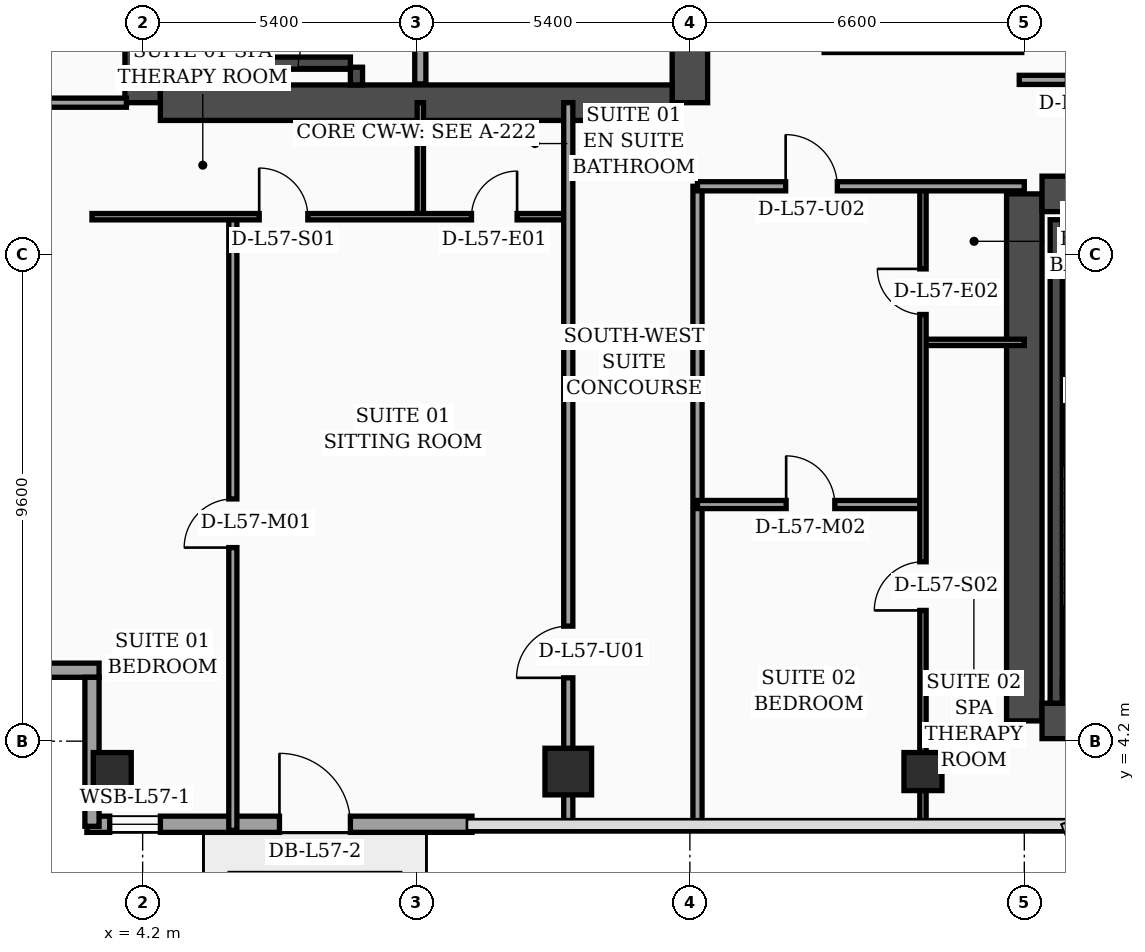
"""IFC4 building model, lengths in metres.
Left out: names, types, materials, properties, quantities, classifications, styles, units other than length and angle.
Written with IfcOpenShell. Run it as: python <this file> out.ifc"""

import sys

from ifc_helpers import new_model, si_unit, direction, frame, frame_2d, origin, origin_2d, place, context, subcontext, project, spatial, rectangle, hollow_rectangle, extrude, element, fill, save


model = new_model("IFC4")
c1 = context("Model", 3, precision=1e-05, world=origin(), true_north=direction((0.0, 1.0)))
c2 = subcontext(c1, "Body", "Model", "MODEL_VIEW")
j1 = project(units=[si_unit("LENGTHUNIT", "METRE"), si_unit("PLANEANGLEUNIT", "RADIAN")], contexts=[c1])
p1 = place(None, origin())
s1 = spatial("IfcSite", under=j1, at=p1, CompositionType="ELEMENT")
p2 = place(p1, origin())
s2 = spatial("IfcBuilding", under=s1, at=p2, CompositionType="ELEMENT")
p3 = place(p2, frame((0.0, 0.0, 230.7)))
s3 = spatial("IfcBuildingStorey", under=s2, at=p3, CompositionType="ELEMENT", Elevation=230.7)
p4 = place(p3, frame((4.2, 16.8, 0.0), z_axis=(0.0, 0.0, 1.0), x_axis=(0.0, 1.0, 0.0)))
e1 = element("IfcWall", 1, at=p4, inside=s3, PredefinedType="SHEAR", context=c2, shape_type="SweptSolid", body=[
    extrude(rectangle(XDim=21.6, YDim=0.7, at=frame_2d((10.8, 0.0))), origin(), (0.0, 0.0, 1.0), 3.52),
])
p5 = place(p3, frame((15.0, 16.8, 0.0), z_axis=(0.0, 0.0, 1.0), x_axis=(0.0, 1.0, 0.0)))
e2 = element("IfcWall", 2, at=p5, inside=s3, PredefinedType="SHEAR", context=c2, shape_type="SweptSolid", body=[
    extrude(rectangle(XDim=21.6, YDim=0.7, at=frame_2d((10.8, 0.0))), origin(), (0.0, 0.0, 1.0), 3.52),
])
p6 = place(p5, frame((8.65, 0.0, 0.0)))
e3 = element("IfcOpeningElement", 3, at=p6, cuts=e2, PredefinedType="OPENING", context=c2, shape_type="SweptSolid", body=[
    extrude(rectangle(XDim=1.1, YDim=2.2, at=frame_2d((0.55, 1.1))), frame((0.0, 0.36, 0.0), z_axis=(0.0, -1.0, 0.0), x_axis=(1.0, 0.0, 0.0)), (0.0, 0.0, 1.0), 0.72),
])
p7 = place(p5, frame((10.85, 0.0, 0.0)))
e4 = element("IfcOpeningElement", 4, at=p7, cuts=e2, PredefinedType="OPENING", context=c2, shape_type="SweptSolid", body=[
    extrude(rectangle(XDim=1.1, YDim=2.2, at=frame_2d((0.55, 1.1))), frame((0.0, 0.36, 0.0), z_axis=(0.0, -1.0, 0.0), x_axis=(1.0, 0.0, 0.0)), (0.0, 0.0, 1.0), 0.72),
])
p8 = place(p5, frame((13.5, 0.0, 0.0)))
e5 = element("IfcOpeningElement", 5, at=p8, cuts=e2, PredefinedType="OPENING", context=c2, shape_type="SweptSolid", body=[
    extrude(rectangle(XDim=1.1, YDim=2.2, at=frame_2d((0.55, 1.1))), frame((0.0, 0.36, 0.0), z_axis=(0.0, -1.0, 0.0), x_axis=(1.0, 0.0, 0.0)), (0.0, 0.0, 1.0), 0.72),
])
p9 = place(p5, frame((16.15, 0.0, 0.0)))
e6 = element("IfcOpeningElement", 6, at=p9, cuts=e2, PredefinedType="OPENING", context=c2, shape_type="SweptSolid", body=[
    extrude(rectangle(XDim=1.1, YDim=2.2, at=frame_2d((0.55, 1.1))), frame((0.0, 0.36, 0.0), z_axis=(0.0, -1.0, 0.0), x_axis=(1.0, 0.0, 0.0)), (0.0, 0.0, 1.0), 0.72),
])
p10 = place(p3, frame((4.55, 16.8, 0.0), z_axis=(0.0, 0.0, 1.0), x_axis=(1.0, 0.0, 0.0)))
e7 = element("IfcWall", 7, at=p10, inside=s3, PredefinedType="SHEAR", context=c2, shape_type="SweptSolid", body=[
    extrude(rectangle(XDim=10.1, YDim=0.7, at=frame_2d((5.05, 0.0))), origin(), (0.0, 0.0, 1.0), 3.52),
])
p11 = place(p3, frame((21.6, 4.6, 0.0), z_axis=(0.0, 0.0, 1.0), x_axis=(0.0, 1.0, 0.0)))
e8 = element("IfcWall", 8, at=p11, inside=s3, PredefinedType="SHEAR", context=c2, shape_type="SweptSolid", body=[
    extrude(rectangle(XDim=10.4, YDim=0.7, at=frame_2d((5.2, 0.0))), origin(), (0.0, 0.0, 1.0), 3.52),
])
p12 = place(p3, frame((21.95, 15.0, 0.0), z_axis=(0.0, 0.0, 1.0), x_axis=(1.0, 0.0, 0.0)))
e9 = element("IfcWall", 9, at=p12, inside=s3, PredefinedType="SHEAR", context=c2, shape_type="SweptSolid", body=[
    extrude(rectangle(XDim=10.1, YDim=0.7, at=frame_2d((5.05, 0.0))), origin(), (0.0, 0.0, 1.0), 3.52),
])
p13 = place(p12, frame((4.95, 0.0, 0.0)))
e10 = element("IfcOpeningElement", 10, at=p13, cuts=e9, PredefinedType="OPENING", context=c2, shape_type="SweptSolid", body=[
    extrude(rectangle(XDim=1.1, YDim=2.2, at=frame_2d((0.55, 1.1))), frame((0.0, 0.36, 0.0), z_axis=(0.0, -1.0, 0.0), x_axis=(1.0, 0.0, 0.0)), (0.0, 0.0, 1.0), 0.72),
])
p14 = place(p3, frame((21.95, 4.6, 0.0), z_axis=(0.0, 0.0, 1.0), x_axis=(1.0, 0.0, 0.0)))
e11 = element("IfcWall", 11, at=p14, inside=s3, PredefinedType="SHEAR", context=c2, shape_type="SweptSolid", body=[
    extrude(rectangle(XDim=10.1, YDim=0.7, at=frame_2d((5.05, 0.0))), origin(), (0.0, 0.0, 1.0), 3.52),
])
p15 = place(p3, frame((5.08, 17.15, 0.0), z_axis=(0.0, 0.0, 1.0), x_axis=(0.0, 1.0, 0.0)))
e12 = element("IfcWall", 12, at=p15, inside=s3, PredefinedType="SOLIDWALL", context=c2, shape_type="SweptSolid", body=[
    extrude(rectangle(XDim=9.64, YDim=0.24, at=frame_2d((4.82, 0.0))), origin(), (0.0, 0.0, 1.0), 3.52),
])
p16 = place(p3, frame((8.42, 17.15, 0.0), z_axis=(0.0, 0.0, 1.0), x_axis=(0.0, 1.0, 0.0)))
e13 = element("IfcWall", 13, at=p16, inside=s3, PredefinedType="SOLIDWALL", context=c2, shape_type="SweptSolid", body=[
    extrude(rectangle(XDim=9.64, YDim=0.24, at=frame_2d((4.82, 0.0))), origin(), (0.0, 0.0, 1.0), 3.52),
])
p17 = place(p16, frame((0.35, 0.0, 0.0)))
e14 = element("IfcOpeningElement", 14, at=p17, cuts=e13, PredefinedType="OPENING", context=c2, shape_type="SweptSolid", body=[
    extrude(rectangle(XDim=1.15, YDim=2.2, at=frame_2d((0.575, 1.1))), frame((0.0, 0.13, 0.0), z_axis=(0.0, -1.0, 0.0), x_axis=(1.0, 0.0, 0.0)), (0.0, 0.0, 1.0), 0.26),
])
p18 = place(p3, frame((5.2, 17.58, 0.0), z_axis=(0.0, 0.0, 1.0), x_axis=(1.0, 0.0, 0.0)))
e15 = element("IfcWall", 15, at=p18, inside=s3, PredefinedType="SOLIDWALL", context=c2, shape_type="SweptSolid", body=[
    extrude(rectangle(XDim=3.1, YDim=0.24, at=frame_2d((1.55, 0.0))), origin(), (0.0, 0.0, 1.0), 3.52),
])
p19 = place(p3, frame((22.23, 4.95, 0.0), z_axis=(0.0, 0.0, 1.0), x_axis=(0.0, 1.0, 0.0)))
e16 = element("IfcWall", 16, at=p19, inside=s3, PredefinedType="SOLIDWALL", context=c2, shape_type="SweptSolid", body=[
    extrude(rectangle(XDim=9.54, YDim=0.24, at=frame_2d((4.77, 0.0))), origin(), (0.0, 0.0, 1.0), 3.52),
])
for number, where, z_axis, x_axis in (
    (17, (22.35, 5.28, 0.0), (0.0, 0.0, 1.0), (1.0, 0.0, 0.0)),
    (18, (22.35, 14.37, 0.0), (0.0, 0.0, 1.0), (1.0, 0.0, 0.0)),
):
    element("IfcWall", number, at=place(p3, frame(where, z_axis=z_axis, x_axis=x_axis)), inside=s3, PredefinedType="SOLIDWALL", context=c2, shape_type="SweptSolid", body=[
        extrude(rectangle(XDim=3.1, YDim=0.24, at=frame_2d((1.55, 0.0))), origin(), (0.0, 0.0, 1.0), 3.52),
    ])
p20 = place(p3, frame((3.6, 3.6, 0.0), z_axis=(0.0, 0.0, 1.0), x_axis=(1.0, 0.0, 0.0)))
e19 = element("IfcColumn", 19, at=p20, inside=s3, PredefinedType="COLUMN", context=c2, shape_type="SweptSolid", body=[
    extrude(hollow_rectangle(XDim=0.75, YDim=0.75, WallThickness=0.032, at=origin_2d()), origin(), (0.0, 0.0, 1.0), 3.52),
])
p21 = place(p3, frame((12.6, 3.6, 0.0), z_axis=(0.0, 0.0, 1.0), x_axis=(1.0, 0.0, 0.0)))
e20 = element("IfcColumn", 20, at=p21, inside=s3, PredefinedType="COLUMN", context=c2, shape_type="SweptSolid", body=[
    extrude(rectangle(XDim=0.92, YDim=0.92, at=origin_2d()), origin(), (0.0, 0.0, 1.0), 3.52),
])
p22 = place(p3, frame((19.6, 3.6, 0.0), z_axis=(0.0, 0.0, 1.0), x_axis=(1.0, 0.0, 0.0)))
e21 = element("IfcColumn", 21, at=p22, inside=s3, PredefinedType="COLUMN", context=c2, shape_type="SweptSolid", body=[
    extrude(hollow_rectangle(XDim=0.75, YDim=0.75, WallThickness=0.032, at=origin_2d()), origin(), (0.0, 0.0, 1.0), 3.52),
])
p23 = place(p3, frame((3.1, 2.56, 0.0), z_axis=(0.0, 0.0, 1.0), x_axis=(1.0, 0.0, 0.0)))
e22 = element("IfcWall", 22, at=p23, inside=s3, PredefinedType="SOLIDWALL", context=c2, shape_type="SweptSolid", body=[
    extrude(rectangle(XDim=7.6, YDim=0.32, at=frame_2d((3.8, 0.0))), origin(), (0.0, 0.0, 1.0), 3.52),
])
p24 = place(p23, frame((0.45, 0.0, 0.75)))
e23 = element("IfcOpeningElement", 23, at=p24, cuts=e22, PredefinedType="OPENING", context=c2, shape_type="SweptSolid", body=[
    extrude(rectangle(XDim=1.0, YDim=1.6, at=frame_2d((0.5, 0.8))), frame((0.0, 0.17, 0.0), z_axis=(0.0, -1.0, 0.0), x_axis=(1.0, 0.0, 0.0)), (0.0, 0.0, 1.0), 0.34),
])
p25 = place(p23, frame((3.8, 0.0, 0.0)))
e24 = element("IfcOpeningElement", 24, at=p25, cuts=e22, PredefinedType="OPENING", context=c2, shape_type="SweptSolid", body=[
    extrude(rectangle(XDim=1.4, YDim=2.25, at=frame_2d((0.7, 1.125))), frame((0.0, 0.17, 0.0), z_axis=(0.0, -1.0, 0.0), x_axis=(1.0, 0.0, 0.0)), (0.0, 0.0, 1.0), 0.34),
])
p26 = place(p3, frame((0.12, 5.6, 0.0), z_axis=(0.0, 0.0, 1.0), x_axis=(1.0, 0.0, 0.0)))
e25 = element("IfcWall", 25, at=p26, inside=s3, PredefinedType="SOLIDWALL", context=c2, shape_type="SweptSolid", body=[
    extrude(rectangle(XDim=3.22, YDim=0.28, at=frame_2d((1.61, 0.0))), origin(), (0.0, 0.0, 1.0), 2.92),
])
p27 = place(p3, frame((3.2, 5.46, 0.0), z_axis=(0.0, 0.0, 1.0), x_axis=(0.0, -1.0, 0.0)))
e26 = element("IfcWall", 26, at=p27, inside=s3, PredefinedType="SOLIDWALL", context=c2, shape_type="SweptSolid", body=[
    extrude(rectangle(XDim=2.94, YDim=0.28, at=frame_2d((1.47, 0.0))), origin(), (0.0, 0.0, 1.0), 2.92),
])
p28 = place(p3, frame((9.68, 17.17, 0.0), z_axis=(0.0, 0.0, 1.0), x_axis=(0.0, 1.0, 0.0)))
e27 = element("IfcWall", 27, at=p28, inside=s3, PredefinedType="SOLIDWALL", context=c2, shape_type="SweptSolid", body=[
    extrude(rectangle(XDim=7.83, YDim=0.22, at=frame_2d((3.915, 0.0))), origin(), (0.0, 0.0, 1.0), 3.52),
])
p29 = place(p3, frame((0.08, 16.8, 0.0), z_axis=(0.0, 0.0, 1.0), x_axis=(1.0, 0.0, 0.0)))
e28 = element("IfcWall", 28, at=p29, inside=s3, PredefinedType="PARTITIONING", context=c2, shape_type="SweptSolid", body=[
    extrude(rectangle(XDim=3.8, YDim=0.18, at=frame_2d((1.9, 0.0))), origin(), (0.0, 0.0, 1.0), 2.92),
])
p30 = place(p3, frame((9.68, 14.55, 0.0), z_axis=(0.0, 0.0, 1.0), x_axis=(0.0, 1.0, 0.0)))
e29 = element("IfcWall", 29, at=p30, inside=s3, PredefinedType="PARTITIONING", context=c2, shape_type="SweptSolid", body=[
    extrude(rectangle(XDim=2.25, YDim=0.125, at=frame_2d((1.125, 0.0))), origin(), (0.0, 0.0, 1.0), 3.52),
])
p31 = place(p3, frame((5.98, 2.44, 0.0), z_axis=(0.0, 0.0, 1.0), x_axis=(0.0, 1.0, 0.0)))
e30 = element("IfcWall", 30, at=p31, inside=s3, PredefinedType="PARTITIONING", context=c2, shape_type="SweptSolid", body=[
    extrude(rectangle(XDim=12.11, YDim=0.16, at=frame_2d((6.055, 0.0))), origin(), (0.0, 0.0, 1.0), 3.07),
])
p32 = place(p31, frame((5.58, 0.0, 0.0)))
e31 = element("IfcOpeningElement", 31, at=p32, cuts=e30, PredefinedType="OPENING", context=c2, shape_type="SweptSolid", body=[
    extrude(rectangle(XDim=0.96, YDim=2.2, at=frame_2d((0.48, 1.1))), frame((0.0, 0.09, 0.0), z_axis=(0.0, -1.0, 0.0), x_axis=(1.0, 0.0, 0.0)), (0.0, 0.0, 1.0), 0.18),
])
p33 = place(p3, frame((3.2, 14.55, 0.0), z_axis=(0.0, 0.0, 1.0), x_axis=(1.0, 0.0, 0.0)))
e32 = element("IfcWall", 32, at=p33, inside=s3, PredefinedType="PARTITIONING", context=c2, shape_type="SweptSolid", body=[
    extrude(rectangle(XDim=9.4, YDim=0.125, at=frame_2d((4.7, 0.0))), origin(), (0.0, 0.0, 1.0), 2.92),
])
p34 = place(p33, frame((3.3, 0.0, 0.0)))
e33 = element("IfcOpeningElement", 33, at=p34, cuts=e32, PredefinedType="OPENING", context=c2, shape_type="SweptSolid", body=[
    extrude(rectangle(XDim=0.96, YDim=2.2, at=frame_2d((0.48, 1.1))), frame((0.0, 0.073, 0.0), z_axis=(0.0, -1.0, 0.0), x_axis=(1.0, 0.0, 0.0)), (0.0, 0.0, 1.0), 0.145),
])
p35 = place(p33, frame((7.49, 0.0, 0.0)))
e34 = element("IfcOpeningElement", 34, at=p35, cuts=e32, PredefinedType="OPENING", context=c2, shape_type="SweptSolid", body=[
    extrude(rectangle(XDim=0.9, YDim=2.15, at=frame_2d((0.45, 1.075))), frame((0.0, 0.073, 0.0), z_axis=(0.0, -1.0, 0.0), x_axis=(1.0, 0.0, 0.0)), (0.0, 0.0, 1.0), 0.145),
])
p36 = place(p3, frame((12.6, 2.44, 0.0), z_axis=(0.0, 0.0, 1.0), x_axis=(0.0, 1.0, 0.0)))
e35 = element("IfcWall", 35, at=p36, inside=s3, PredefinedType="PARTITIONING", context=c2, shape_type="SweptSolid", body=[
    extrude(rectangle(XDim=14.36, YDim=0.18, at=frame_2d((7.18, 0.0))), origin(), (0.0, 0.0, 1.0), 2.92),
])
p37 = place(p36, frame((3.01, 0.0, 0.0)))
e36 = element("IfcOpeningElement", 36, at=p37, cuts=e35, PredefinedType="OPENING", context=c2, shape_type="SweptSolid", body=[
    extrude(rectangle(XDim=1.02, YDim=2.2, at=frame_2d((0.51, 1.1))), frame((0.0, 0.1, 0.0), z_axis=(0.0, -1.0, 0.0), x_axis=(1.0, 0.0, 0.0)), (0.0, 0.0, 1.0), 0.2),
])
p38 = place(p3, frame((15.15, 2.44, 0.0), z_axis=(0.0, 0.0, 1.0), x_axis=(0.0, 1.0, 0.0)))
e37 = element("IfcWall", 37, at=p38, inside=s3, PredefinedType="PARTITIONING", context=c2, shape_type="SweptSolid", body=[
    extrude(rectangle(XDim=12.71, YDim=0.18, at=frame_2d((6.355, 0.0))), origin(), (0.0, 0.0, 1.0), 3.07),
])
p39 = place(p3, frame((19.6, 12.07, 0.0), z_axis=(0.0, 0.0, 1.0), x_axis=(1.0, 0.0, 0.0)))
e38 = element("IfcWall", 38, at=p39, inside=s3, PredefinedType="PARTITIONING", context=c2, shape_type="SweptSolid", body=[
    extrude(rectangle(XDim=2.0, YDim=0.125, at=frame_2d((1.0, 0.0))), origin(), (0.0, 0.0, 1.0), 3.52),
])
p40 = place(p3, frame((15.15, 8.87, 0.0), z_axis=(0.0, 0.0, 1.0), x_axis=(1.0, 0.0, 0.0)))
e39 = element("IfcWall", 39, at=p40, inside=s3, PredefinedType="PARTITIONING", context=c2, shape_type="SweptSolid", body=[
    extrude(rectangle(XDim=4.45, YDim=0.16, at=frame_2d((2.225, 0.0))), origin(), (0.0, 0.0, 1.0), 3.52),
])
p41 = place(p40, frame((1.75, 0.0, 0.0)))
e40 = element("IfcOpeningElement", 40, at=p41, cuts=e39, PredefinedType="OPENING", context=c2, shape_type="SweptSolid", body=[
    extrude(rectangle(XDim=0.96, YDim=2.2, at=frame_2d((0.48, 1.1))), frame((0.0, 0.09, 0.0), z_axis=(0.0, -1.0, 0.0), x_axis=(1.0, 0.0, 0.0)), (0.0, 0.0, 1.0), 0.18),
])
p42 = place(p3, frame((19.6, 2.44, 0.0), z_axis=(0.0, 0.0, 1.0), x_axis=(0.0, 1.0, 0.0)))
e41 = element("IfcWall", 41, at=p42, inside=s3, PredefinedType="PARTITIONING", context=c2, shape_type="SweptSolid", body=[
    extrude(rectangle(XDim=12.71, YDim=0.125, at=frame_2d((6.355, 0.0))), origin(), (0.0, 0.0, 1.0), 2.57),
])
p43 = place(p42, frame((4.34, 0.0, 0.0)))
e42 = element("IfcOpeningElement", 42, at=p43, cuts=e41, PredefinedType="OPENING", context=c2, shape_type="SweptSolid", body=[
    extrude(rectangle(XDim=0.96, YDim=2.2, at=frame_2d((0.48, 1.1))), frame((0.0, 0.073, 0.0), z_axis=(0.0, -1.0, 0.0), x_axis=(1.0, 0.0, 0.0)), (0.0, 0.0, 1.0), 0.145),
])
p44 = place(p42, frame((10.18, 0.0, 0.0)))
e43 = element("IfcOpeningElement", 43, at=p44, cuts=e41, PredefinedType="OPENING", context=c2, shape_type="SweptSolid", body=[
    extrude(rectangle(XDim=0.9, YDim=2.15, at=frame_2d((0.45, 1.075))), frame((0.0, 0.073, 0.0), z_axis=(0.0, -1.0, 0.0), x_axis=(1.0, 0.0, 0.0)), (0.0, 0.0, 1.0), 0.145),
])
p45 = place(p3, frame((15.15, 15.15, 0.0), z_axis=(0.0, 0.0, 1.0), x_axis=(1.0, 0.0, 0.0)))
e44 = element("IfcWall", 44, at=p45, inside=s3, PredefinedType="PARTITIONING", context=c2, shape_type="SweptSolid", body=[
    extrude(rectangle(XDim=6.45, YDim=0.18, at=frame_2d((3.225, 0.0))), origin(), (0.0, 0.0, 1.0), 2.57),
])
p46 = place(p45, frame((1.74, 0.0, 0.0)))
e45 = element("IfcOpeningElement", 45, at=p46, cuts=e44, PredefinedType="OPENING", context=c2, shape_type="SweptSolid", body=[
    extrude(rectangle(XDim=1.02, YDim=2.2, at=frame_2d((0.51, 1.1))), frame((0.0, 0.1, 0.0), z_axis=(0.0, -1.0, 0.0), x_axis=(1.0, 0.0, 0.0)), (0.0, 0.0, 1.0), 0.2),
])
p47 = place(p3, frame((17.65, 17.88, 0.0), z_axis=(0.0, 0.0, 1.0), x_axis=(1.0, 0.0, 0.0)))
e46 = element("IfcWall", 46, at=p47, inside=s3, PredefinedType="PARTITIONING", context=c2, shape_type="SweptSolid", body=[
    extrude(rectangle(XDim=3.9, YDim=0.18, at=frame_2d((1.95, 0.0))), origin(), (0.0, 0.0, 1.0), 3.52),
])
p48 = place(p3, frame((21.5, 17.25, 0.0), z_axis=(0.0, 0.0, 1.0), x_axis=(1.0, 0.0, 0.0)))
e47 = element("IfcWall", 47, at=p48, inside=s3, PredefinedType="PARTITIONING", context=c2, shape_type="SweptSolid", body=[
    extrude(rectangle(XDim=6.9, YDim=0.18, at=frame_2d((3.45, 0.0))), origin(), (0.0, 0.0, 1.0), 2.92),
])
p49 = place(p48, frame((0.95, 0.0, 0.0)))
e48 = element("IfcOpeningElement", 48, at=p49, cuts=e47, PredefinedType="OPENING", context=c2, shape_type="SweptSolid", body=[
    extrude(rectangle(XDim=1.02, YDim=2.2, at=frame_2d((0.51, 1.1))), frame((0.0, 0.1, 0.0), z_axis=(0.0, -1.0, 0.0), x_axis=(1.0, 0.0, 0.0)), (0.0, 0.0, 1.0), 0.2),
])
p50 = place(p24, origin())
e49 = element("IfcWindow", 49, at=p50, inside=s3, PartitioningType="SINGLE_PANEL", PredefinedType="WINDOW", context=c2, shape_type="SweptSolid", body=[
    extrude(rectangle(XDim=1.0, YDim=1.6, at=frame_2d((0.5, 0.8))), frame((0.0, 0.03, 0.0), z_axis=(0.0, -1.0, 0.0), x_axis=(1.0, 0.0, 0.0)), (0.0, 0.0, 1.0), 0.06),
])
fill(e23, e49)
p51 = place(p25, origin())
e50 = element("IfcDoor", 50, at=p51, inside=s3, OperationType="SINGLE_SWING_LEFT", PredefinedType="DOOR", context=c2, shape_type="SweptSolid", body=[
    extrude(rectangle(XDim=1.4, YDim=2.25, at=frame_2d((0.7, 1.125))), frame((0.0, 0.025, 0.0), z_axis=(0.0, -1.0, 0.0), x_axis=(1.0, 0.0, 0.0)), (0.0, 0.0, 1.0), 0.05),
])
fill(e24, e50)
p52 = place(p32, origin())
e51 = element("IfcDoor", 51, at=p52, inside=s3, OperationType="SINGLE_SWING_LEFT", PredefinedType="DOOR", context=c2, shape_type="SweptSolid", body=[
    extrude(rectangle(XDim=0.96, YDim=2.2, at=frame_2d((0.48, 1.1))), frame((0.0, 0.025, 0.0), z_axis=(0.0, -1.0, 0.0), x_axis=(1.0, 0.0, 0.0)), (0.0, 0.0, 1.0), 0.05),
])
fill(e31, e51)
p53 = place(p34, origin())
e52 = element("IfcDoor", 52, at=p53, inside=s3, OperationType="SINGLE_SWING_LEFT", PredefinedType="DOOR", context=c2, shape_type="SweptSolid", body=[
    extrude(rectangle(XDim=0.96, YDim=2.2, at=frame_2d((0.48, 1.1))), frame((0.0, 0.025, 0.0), z_axis=(0.0, -1.0, 0.0), x_axis=(1.0, 0.0, 0.0)), (0.0, 0.0, 1.0), 0.05),
])
fill(e33, e52)
p54 = place(p35, origin())
e53 = element("IfcDoor", 53, at=p54, inside=s3, OperationType="SINGLE_SWING_RIGHT", PredefinedType="DOOR", context=c2, shape_type="SweptSolid", body=[
    extrude(rectangle(XDim=0.9, YDim=2.15, at=frame_2d((0.45, 1.075))), frame((0.0, 0.025, 0.0), z_axis=(0.0, -1.0, 0.0), x_axis=(1.0, 0.0, 0.0)), (0.0, 0.0, 1.0), 0.05),
])
fill(e34, e53)
p55 = place(p37, origin())
e54 = element("IfcDoor", 54, at=p55, inside=s3, OperationType="SINGLE_SWING_LEFT", PredefinedType="DOOR", context=c2, shape_type="SweptSolid", body=[
    extrude(rectangle(XDim=1.02, YDim=2.2, at=frame_2d((0.51, 1.1))), frame((0.0, 0.025, 0.0), z_axis=(0.0, -1.0, 0.0), x_axis=(1.0, 0.0, 0.0)), (0.0, 0.0, 1.0), 0.05),
])
fill(e36, e54)
p56 = place(p41, origin())
e55 = element("IfcDoor", 55, at=p56, inside=s3, OperationType="SINGLE_SWING_LEFT", PredefinedType="DOOR", context=c2, shape_type="SweptSolid", body=[
    extrude(rectangle(XDim=0.96, YDim=2.2, at=frame_2d((0.48, 1.1))), frame((0.0, 0.025, 0.0), z_axis=(0.0, -1.0, 0.0), x_axis=(1.0, 0.0, 0.0)), (0.0, 0.0, 1.0), 0.05),
])
fill(e40, e55)
p57 = place(p43, origin())
e56 = element("IfcDoor", 56, at=p57, inside=s3, OperationType="SINGLE_SWING_LEFT", PredefinedType="DOOR", context=c2, shape_type="SweptSolid", body=[
    extrude(rectangle(XDim=0.96, YDim=2.2, at=frame_2d((0.48, 1.1))), frame((0.0, 0.025, 0.0), z_axis=(0.0, -1.0, 0.0), x_axis=(1.0, 0.0, 0.0)), (0.0, 0.0, 1.0), 0.05),
])
fill(e42, e56)
p58 = place(p44, origin())
e57 = element("IfcDoor", 57, at=p58, inside=s3, OperationType="SINGLE_SWING_RIGHT", PredefinedType="DOOR", context=c2, shape_type="SweptSolid", body=[
    extrude(rectangle(XDim=0.9, YDim=2.15, at=frame_2d((0.45, 1.075))), frame((0.0, 0.025, 0.0), z_axis=(0.0, -1.0, 0.0), x_axis=(1.0, 0.0, 0.0)), (0.0, 0.0, 1.0), 0.05),
])
fill(e43, e57)
p59 = place(p46, origin())
e58 = element("IfcDoor", 58, at=p59, inside=s3, OperationType="SINGLE_SWING_LEFT", PredefinedType="DOOR", context=c2, shape_type="SweptSolid", body=[
    extrude(rectangle(XDim=1.02, YDim=2.2, at=frame_2d((0.51, 1.1))), frame((0.0, 0.025, 0.0), z_axis=(0.0, -1.0, 0.0), x_axis=(1.0, 0.0, 0.0)), (0.0, 0.0, 1.0), 0.05),
])
fill(e45, e58)
p60 = place(p17, origin())
e59 = element("IfcDoor", 59, at=p60, inside=s3, OperationType="SINGLE_SWING_LEFT", PredefinedType="DOOR", context=c2, shape_type="SweptSolid", body=[
    extrude(rectangle(XDim=1.15, YDim=2.2, at=frame_2d((0.575, 1.1))), frame((0.0, 0.025, 0.0), z_axis=(0.0, -1.0, 0.0), x_axis=(1.0, 0.0, 0.0)), (0.0, 0.0, 1.0), 0.05),
])
fill(e14, e59)
save(model, sys.argv[1])
